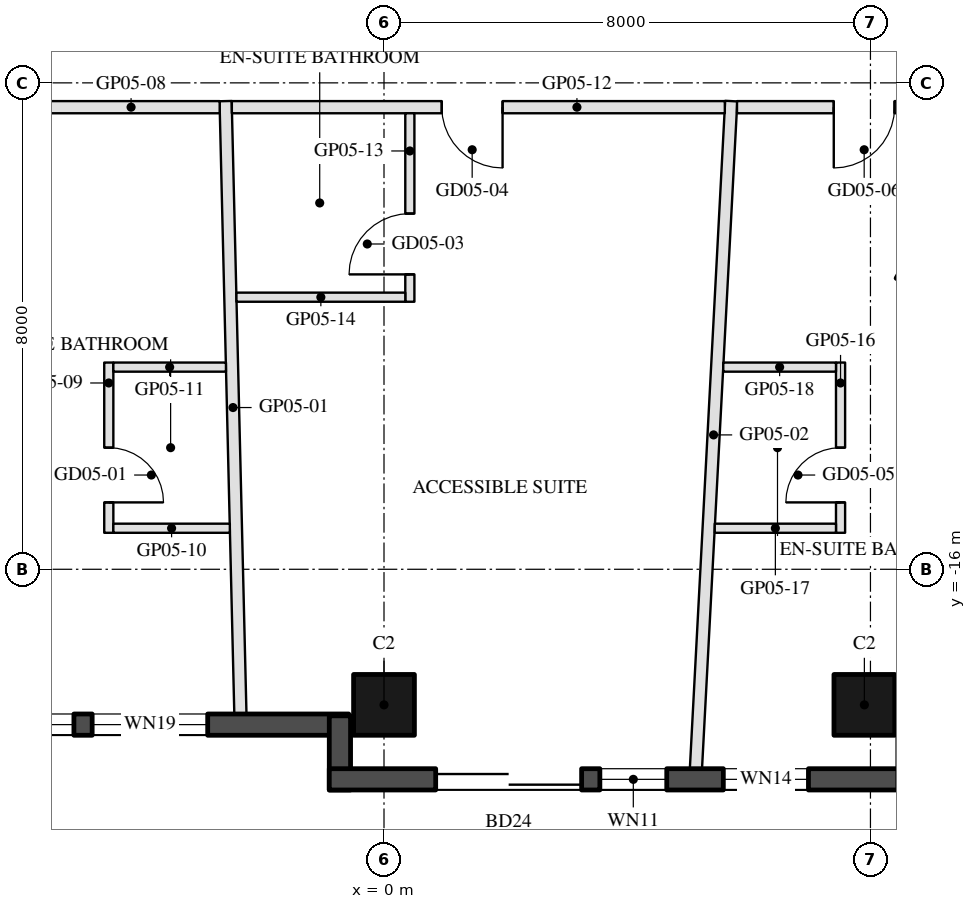
"""IFC4 building model, lengths in metres.
Left out: names, types, materials, properties, quantities, classifications, styles, units other than length and angle.
Written with IfcOpenShell. Run it as: python <this file> out.ifc"""

import sys

from ifc_helpers import new_model, si_unit, direction, frame, frame_2d, origin, origin_2d, place, context, subcontext, project, spatial, rectangle, hollow_rectangle, extrude, element, fill, save


model = new_model("IFC4")
c1 = context("Model", 3, precision=1e-05, world=origin(), true_north=direction((0.0, 1.0)))
c2 = subcontext(c1, "Body", "Model", "MODEL_VIEW")
j1 = project(units=[si_unit("LENGTHUNIT", "METRE"), si_unit("PLANEANGLEUNIT", "RADIAN")], contexts=[c1])
p1 = place(None, origin())
s1 = spatial("IfcSite", under=j1, at=p1, CompositionType="ELEMENT")
p2 = place(p1, origin())
s2 = spatial("IfcBuilding", under=s1, at=p2, CompositionType="ELEMENT")
p3 = place(p2, frame((0.0, 0.0, 83.5)))
s3 = spatial("IfcBuildingStorey", under=s2, at=p3, CompositionType="ELEMENT", Elevation=83.5)
for number, where, z_axis, x_axis in (
    (1, (0.0, -18.23, 0.0), (0.0, 0.0, 1.0), (-1.0, 0.0, 0.0)),
    (2, (7.9, -18.23, 0.0), (0.0, 0.0, 1.0), (-1.0, 0.0, 0.0)),
):
    element("IfcColumn", number, at=place(p3, frame(where, z_axis=z_axis, x_axis=x_axis)), inside=s3, PredefinedType="COLUMN", context=c2, shape_type="SweptSolid", body=[
        extrude(hollow_rectangle(XDim=1.0, YDim=1.0, WallThickness=0.045, at=origin_2d()), origin(), (0.0, 0.0, 1.0), 3.7),
    ])
p4 = place(p3, frame((-7.32, -18.555, 0.0), z_axis=(0.0, 0.0, 1.0), x_axis=(1.0, 0.0, 0.0)))
e3 = element("IfcWall", 3, at=p4, inside=s3, PredefinedType="SOLIDWALL", context=c2, shape_type="SweptSolid", body=[
    extrude(rectangle(XDim=6.74, YDim=0.35, at=frame_2d((3.37, 0.0))), origin(), (0.0, 0.0, 1.0), 3.55),
])
p5 = place(p4, frame((0.32, 0.0, 0.3)))
e4 = element("IfcOpeningElement", 4, at=p5, cuts=e3, PredefinedType="OPENING", context=c2, shape_type="SweptSolid", body=[
    extrude(rectangle(XDim=1.9, YDim=2.65, at=frame_2d((0.95, 1.325))), frame((0.0, 0.185, 0.0), z_axis=(0.0, -1.0, 0.0), x_axis=(1.0, 0.0, 0.0)), (0.0, 0.0, 1.0), 0.37),
])
p6 = place(p4, frame((2.521, 0.0, 0.3)))
e5 = element("IfcOpeningElement", 5, at=p6, cuts=e3, PredefinedType="OPENING", context=c2, shape_type="SweptSolid", body=[
    extrude(rectangle(XDim=1.9, YDim=2.65, at=frame_2d((0.95, 1.325))), frame((0.0, 0.185, 0.0), z_axis=(0.0, -1.0, 0.0), x_axis=(1.0, 0.0, 0.0)), (0.0, 0.0, 1.0), 0.37),
])
p7 = place(p3, frame((-0.725, -18.41, 0.0), z_axis=(0.0, 0.0, 1.0), x_axis=(0.0, -1.0, 0.0)))
e6 = element("IfcWall", 6, at=p7, inside=s3, PredefinedType="SOLIDWALL", context=c2, shape_type="SweptSolid", body=[
    extrude(rectangle(XDim=1.22, YDim=0.35, at=frame_2d((0.61, 0.0))), origin(), (0.0, 0.0, 1.0), 3.55),
])
p8 = place(p3, frame((-0.9, -19.455, 0.0), z_axis=(0.0, 0.0, 1.0), x_axis=(1.0, 0.0, 0.0)))
e7 = element("IfcWall", 7, at=p8, inside=s3, PredefinedType="SOLIDWALL", context=c2, shape_type="SweptSolid", body=[
    extrude(rectangle(XDim=9.7, YDim=0.35, at=frame_2d((4.85, 0.0))), origin(), (0.0, 0.0, 1.0), 3.55),
])
p9 = place(p8, frame((1.75, 0.0, 0.0)))
e8 = element("IfcOpeningElement", 8, at=p9, cuts=e7, PredefinedType="OPENING", context=c2, shape_type="SweptSolid", body=[
    extrude(rectangle(XDim=2.4, YDim=2.4, at=frame_2d((1.2, 1.2))), frame((0.0, 0.185, 0.0), z_axis=(0.0, -1.0, 0.0), x_axis=(1.0, 0.0, 0.0)), (0.0, 0.0, 1.0), 0.37),
])
p10 = place(p8, frame((4.45, 0.0, 0.3)))
e9 = element("IfcOpeningElement", 9, at=p10, cuts=e7, PredefinedType="OPENING", context=c2, shape_type="SweptSolid", body=[
    extrude(rectangle(XDim=1.1, YDim=2.65, at=frame_2d((0.55, 1.325))), frame((0.0, 0.185, 0.0), z_axis=(0.0, -1.0, 0.0), x_axis=(1.0, 0.0, 0.0)), (0.0, 0.0, 1.0), 0.37),
])
p11 = place(p8, frame((6.48, 0.0, 0.3)))
e10 = element("IfcOpeningElement", 10, at=p11, cuts=e7, PredefinedType="OPENING", context=c2, shape_type="SweptSolid", body=[
    extrude(rectangle(XDim=1.4, YDim=2.65, at=frame_2d((0.7, 1.325))), frame((0.0, 0.185, 0.0), z_axis=(0.0, -1.0, 0.0), x_axis=(1.0, 0.0, 0.0)), (0.0, 0.0, 1.0), 0.37),
])
p12 = place(p3, frame((8.547, -10.997, 0.0), z_axis=(0.0, 0.0, 1.0), x_axis=(0.866025009528, -0.500000682871, 0.0)))
e11 = element("IfcWall", 11, at=p12, inside=s3, PredefinedType="SHEAR", context=c2, shape_type="SweptSolid", body=[
    extrude(rectangle(XDim=14.837, YDim=0.5, at=frame_2d((7.418, 0.0))), origin(), (0.0, 0.0, 1.0), 3.5),
])
p13 = place(p3, frame((-2.362, -18.38, 0.0), z_axis=(0.0, 0.0, 1.0), x_axis=(-0.024092600153, 0.999709731181, 0.0)))
e12 = element("IfcWall", 12, at=p13, inside=s3, PredefinedType="PARTITIONING", context=c2, shape_type="SweptSolid", body=[
    extrude(rectangle(XDim=10.083, YDim=0.2, at=frame_2d((5.042, 0.0))), origin(), (0.0, 0.0, 1.0), 2.96),
])
p14 = place(p3, frame((5.13, -19.28, 0.0), z_axis=(0.0, 0.0, 1.0), x_axis=(0.052823378142, 0.998603870772, 0.0)))
e13 = element("IfcWall", 13, at=p14, inside=s3, PredefinedType="PARTITIONING", context=c2, shape_type="SweptSolid", body=[
    extrude(rectangle(XDim=10.995, YDim=0.2, at=frame_2d((5.498, 0.0))), origin(), (0.0, 0.0, 1.0), 2.96),
])
p15 = place(p3, frame((-2.702, -8.4, 0.0), z_axis=(0.0, 0.0, 1.0), x_axis=(-1.0, 0.0, 0.0)))
e14 = element("IfcWall", 14, at=p15, inside=s3, PredefinedType="PARTITIONING", context=c2, shape_type="SweptSolid", body=[
    extrude(rectangle(XDim=7.286, YDim=0.2, at=frame_2d((3.643, 0.0))), origin(), (0.0, 0.0, 1.0), 2.95),
])
p16 = place(p15, frame((3.143, 0.0, 0.0)))
e15 = element("IfcOpeningElement", 15, at=p16, cuts=e14, PredefinedType="OPENING", context=c2, shape_type="SweptSolid", body=[
    extrude(rectangle(XDim=1.0, YDim=2.1, at=frame_2d((0.5, 1.05))), frame((0.0, 0.11, 0.0), z_axis=(0.0, -1.0, 0.0), x_axis=(1.0, 0.0, 0.0)), (0.0, 0.0, 1.0), 0.22),
])
p17 = place(p3, frame((-4.526, -12.6, 0.0), z_axis=(0.0, 0.0, 1.0), x_axis=(0.0, -1.0, 0.0)))
e16 = element("IfcWall", 16, at=p17, inside=s3, PredefinedType="PARTITIONING", context=c2, shape_type="SweptSolid", body=[
    extrude(rectangle(XDim=2.8, YDim=0.15, at=frame_2d((1.4, 0.0))), origin(), (0.0, 0.0, 1.0), 3.55),
])
p18 = place(p17, frame((1.4, 0.0, 0.0)))
e17 = element("IfcOpeningElement", 17, at=p18, cuts=e16, PredefinedType="OPENING", context=c2, shape_type="SweptSolid", body=[
    extrude(rectangle(XDim=0.9, YDim=2.1, at=frame_2d((0.45, 1.05))), frame((0.0, 0.085, 0.0), z_axis=(0.0, -1.0, 0.0), x_axis=(1.0, 0.0, 0.0)), (0.0, 0.0, 1.0), 0.17),
])
p19 = place(p3, frame((-4.451, -15.325, 0.0), z_axis=(0.0, 0.0, 1.0), x_axis=(1.0, 0.0, 0.0)))
e18 = element("IfcWall", 18, at=p19, inside=s3, PredefinedType="PARTITIONING", context=c2, shape_type="SweptSolid", body=[
    extrude(rectangle(XDim=1.916, YDim=0.15, at=frame_2d((0.958, 0.0))), origin(), (0.0, 0.0, 1.0), 2.95),
])
p20 = place(p3, frame((-4.451, -12.675, 0.0), z_axis=(0.0, 0.0, 1.0), x_axis=(1.0, 0.0, 0.0)))
e19 = element("IfcWall", 19, at=p20, inside=s3, PredefinedType="PARTITIONING", context=c2, shape_type="SweptSolid", body=[
    extrude(rectangle(XDim=1.852, YDim=0.15, at=frame_2d((0.926, 0.0))), origin(), (0.0, 0.0, 1.0), 2.95),
])
p21 = place(p3, frame((5.605, -8.4, 0.0), z_axis=(0.0, 0.0, 1.0), x_axis=(-1.0, 0.0, 0.0)))
e20 = element("IfcWall", 20, at=p21, inside=s3, PredefinedType="PARTITIONING", context=c2, shape_type="SweptSolid", body=[
    extrude(rectangle(XDim=8.107, YDim=0.2, at=frame_2d((4.054, 0.0))), origin(), (0.0, 0.0, 1.0), 2.95),
])
p22 = place(p21, frame((3.655, 0.0, 0.0)))
e21 = element("IfcOpeningElement", 21, at=p22, cuts=e20, PredefinedType="OPENING", context=c2, shape_type="SweptSolid", body=[
    extrude(rectangle(XDim=1.0, YDim=2.1, at=frame_2d((0.5, 1.05))), frame((0.0, 0.11, 0.0), z_axis=(0.0, -1.0, 0.0), x_axis=(1.0, 0.0, 0.0)), (0.0, 0.0, 1.0), 0.22),
])
p23 = place(p3, frame((0.425, -11.6, 0.0), z_axis=(0.0, 0.0, 1.0), x_axis=(0.0, 1.0, 0.0)))
e22 = element("IfcWall", 22, at=p23, inside=s3, PredefinedType="PARTITIONING", context=c2, shape_type="SweptSolid", body=[
    extrude(rectangle(XDim=3.1, YDim=0.15, at=frame_2d((1.55, 0.0))), origin(), (0.0, 0.0, 1.0), 3.55),
])
p24 = place(p23, frame((0.45, 0.0, 0.0)))
e23 = element("IfcOpeningElement", 23, at=p24, cuts=e22, PredefinedType="OPENING", context=c2, shape_type="SweptSolid", body=[
    extrude(rectangle(XDim=1.0, YDim=2.1, at=frame_2d((0.5, 1.05))), frame((0.0, 0.085, 0.0), z_axis=(0.0, -1.0, 0.0), x_axis=(1.0, 0.0, 0.0)), (0.0, 0.0, 1.0), 0.17),
])
p25 = place(p3, frame((-2.427, -11.525, 0.0), z_axis=(0.0, 0.0, 1.0), x_axis=(1.0, 0.0, 0.0)))
e24 = element("IfcWall", 24, at=p25, inside=s3, PredefinedType="PARTITIONING", context=c2, shape_type="SweptSolid", body=[
    extrude(rectangle(XDim=2.777, YDim=0.15, at=frame_2d((1.389, 0.0))), origin(), (0.0, 0.0, 1.0), 2.95),
])
p26 = place(p3, frame((9.988, -8.4, 0.0), z_axis=(0.0, 0.0, 1.0), x_axis=(-1.0, 0.0, 0.0)))
e25 = element("IfcWall", 25, at=p26, inside=s3, PredefinedType="PARTITIONING", context=c2, shape_type="SweptSolid", body=[
    extrude(rectangle(XDim=4.183, YDim=0.2, at=frame_2d((2.091, 0.0))), origin(), (0.0, 0.0, 1.0), 2.95),
])
p27 = place(p26, frame((1.591, 0.0, 0.0)))
e26 = element("IfcOpeningElement", 26, at=p27, cuts=e25, PredefinedType="OPENING", context=c2, shape_type="SweptSolid", body=[
    extrude(rectangle(XDim=1.0, YDim=2.1, at=frame_2d((0.5, 1.05))), frame((0.0, 0.11, 0.0), z_axis=(0.0, -1.0, 0.0), x_axis=(1.0, 0.0, 0.0)), (0.0, 0.0, 1.0), 0.22),
])
p28 = place(p3, frame((7.508, -15.4, 0.0), z_axis=(0.0, 0.0, 1.0), x_axis=(0.0, 1.0, 0.0)))
e27 = element("IfcWall", 27, at=p28, inside=s3, PredefinedType="PARTITIONING", context=c2, shape_type="SweptSolid", body=[
    extrude(rectangle(XDim=2.8, YDim=0.15, at=frame_2d((1.4, 0.0))), origin(), (0.0, 0.0, 1.0), 3.55),
])
p29 = place(p28, frame((0.5, 0.0, 0.0)))
e28 = element("IfcOpeningElement", 28, at=p29, cuts=e27, PredefinedType="OPENING", context=c2, shape_type="SweptSolid", body=[
    extrude(rectangle(XDim=0.9, YDim=2.1, at=frame_2d((0.45, 1.05))), frame((0.0, 0.085, 0.0), z_axis=(0.0, -1.0, 0.0), x_axis=(1.0, 0.0, 0.0)), (0.0, 0.0, 1.0), 0.17),
])
p30 = place(p3, frame((5.439, -15.325, 0.0), z_axis=(0.0, 0.0, 1.0), x_axis=(1.0, 0.0, 0.0)))
e29 = element("IfcWall", 29, at=p30, inside=s3, PredefinedType="PARTITIONING", context=c2, shape_type="SweptSolid", body=[
    extrude(rectangle(XDim=1.994, YDim=0.15, at=frame_2d((0.997, 0.0))), origin(), (0.0, 0.0, 1.0), 3.55),
])
p31 = place(p3, frame((5.579, -12.675, 0.0), z_axis=(0.0, 0.0, 1.0), x_axis=(1.0, 0.0, 0.0)))
e30 = element("IfcWall", 30, at=p31, inside=s3, PredefinedType="PARTITIONING", context=c2, shape_type="SweptSolid", body=[
    extrude(rectangle(XDim=1.854, YDim=0.15, at=frame_2d((0.927, 0.0))), origin(), (0.0, 0.0, 1.0), 3.55),
])
p32 = place(p5, origin())
e31 = element("IfcWindow", 31, at=p32, inside=s3, PartitioningType="SINGLE_PANEL", PredefinedType="WINDOW", context=c2, shape_type="SweptSolid", body=[
    extrude(rectangle(XDim=1.9, YDim=2.65, at=frame_2d((0.95, 1.325))), frame((0.0, 0.03, 0.0), z_axis=(0.0, -1.0, 0.0), x_axis=(1.0, 0.0, 0.0)), (0.0, 0.0, 1.0), 0.06),
])
fill(e4, e31)
p33 = place(p6, origin())
e32 = element("IfcWindow", 32, at=p33, inside=s3, PartitioningType="SINGLE_PANEL", PredefinedType="WINDOW", context=c2, shape_type="SweptSolid", body=[
    extrude(rectangle(XDim=1.9, YDim=2.65, at=frame_2d((0.95, 1.325))), frame((0.0, 0.03, 0.0), z_axis=(0.0, -1.0, 0.0), x_axis=(1.0, 0.0, 0.0)), (0.0, 0.0, 1.0), 0.06),
])
fill(e5, e32)
p34 = place(p9, frame((2.4, 0.0, 0.0), z_axis=(0.0, 0.0, 1.0), x_axis=(-1.0, 0.0, 0.0)))
e33 = element("IfcDoor", 33, at=p34, inside=s3, OperationType="SLIDING_TO_LEFT", PredefinedType="DOOR", context=c2, shape_type="SweptSolid", body=[
    extrude(rectangle(XDim=2.4, YDim=2.4, at=frame_2d((1.2, 1.2))), frame((0.0, 0.025, 0.0), z_axis=(0.0, -1.0, 0.0), x_axis=(1.0, 0.0, 0.0)), (0.0, 0.0, 1.0), 0.05),
])
fill(e8, e33)
p35 = place(p10, origin())
e34 = element("IfcWindow", 34, at=p35, inside=s3, PartitioningType="SINGLE_PANEL", PredefinedType="WINDOW", context=c2, shape_type="SweptSolid", body=[
    extrude(rectangle(XDim=1.1, YDim=2.65, at=frame_2d((0.55, 1.325))), frame((0.0, 0.03, 0.0), z_axis=(0.0, -1.0, 0.0), x_axis=(1.0, 0.0, 0.0)), (0.0, 0.0, 1.0), 0.06),
])
fill(e9, e34)
p36 = place(p11, origin())
e35 = element("IfcWindow", 35, at=p36, inside=s3, PartitioningType="SINGLE_PANEL", PredefinedType="WINDOW", context=c2, shape_type="SweptSolid", body=[
    extrude(rectangle(XDim=1.4, YDim=2.65, at=frame_2d((0.7, 1.325))), frame((0.0, 0.03, 0.0), z_axis=(0.0, -1.0, 0.0), x_axis=(1.0, 0.0, 0.0)), (0.0, 0.0, 1.0), 0.06),
])
fill(e10, e35)
p37 = place(p18, origin())
e36 = element("IfcDoor", 36, at=p37, inside=s3, OperationType="SINGLE_SWING_RIGHT", PredefinedType="DOOR", context=c2, shape_type="SweptSolid", body=[
    extrude(rectangle(XDim=0.9, YDim=2.1, at=frame_2d((0.45, 1.05))), frame((0.0, 0.025, 0.0), z_axis=(0.0, -1.0, 0.0), x_axis=(1.0, 0.0, 0.0)), (0.0, 0.0, 1.0), 0.05),
])
fill(e17, e36)
p38 = place(p24, origin())
e37 = element("IfcDoor", 37, at=p38, inside=s3, OperationType="SINGLE_SWING_LEFT", PredefinedType="DOOR", context=c2, shape_type="SweptSolid", body=[
    extrude(rectangle(XDim=1.0, YDim=2.1, at=frame_2d((0.5, 1.05))), frame((0.0, 0.025, 0.0), z_axis=(0.0, -1.0, 0.0), x_axis=(1.0, 0.0, 0.0)), (0.0, 0.0, 1.0), 0.05),
])
fill(e23, e37)
p39 = place(p22, origin())
e38 = element("IfcDoor", 38, at=p39, inside=s3, OperationType="SINGLE_SWING_LEFT", PredefinedType="DOOR", context=c2, shape_type="SweptSolid", body=[
    extrude(rectangle(XDim=1.0, YDim=2.1, at=frame_2d((0.5, 1.05))), frame((0.0, 0.025, 0.0), z_axis=(0.0, -1.0, 0.0), x_axis=(1.0, 0.0, 0.0)), (0.0, 0.0, 1.0), 0.05),
])
fill(e21, e38)
p40 = place(p29, origin())
e39 = element("IfcDoor", 39, at=p40, inside=s3, OperationType="SINGLE_SWING_LEFT", PredefinedType="DOOR", context=c2, shape_type="SweptSolid", body=[
    extrude(rectangle(XDim=0.9, YDim=2.1, at=frame_2d((0.45, 1.05))), frame((0.0, 0.025, 0.0), z_axis=(0.0, -1.0, 0.0), x_axis=(1.0, 0.0, 0.0)), (0.0, 0.0, 1.0), 0.05),
])
fill(e28, e39)
p41 = place(p27, origin())
e40 = element("IfcDoor", 40, at=p41, inside=s3, OperationType="SINGLE_SWING_RIGHT", PredefinedType="DOOR", context=c2, shape_type="SweptSolid", body=[
    extrude(rectangle(XDim=1.0, YDim=2.1, at=frame_2d((0.5, 1.05))), frame((0.0, 0.025, 0.0), z_axis=(0.0, -1.0, 0.0), x_axis=(1.0, 0.0, 0.0)), (0.0, 0.0, 1.0), 0.05),
])
fill(e26, e40)
save(model, sys.argv[1])
